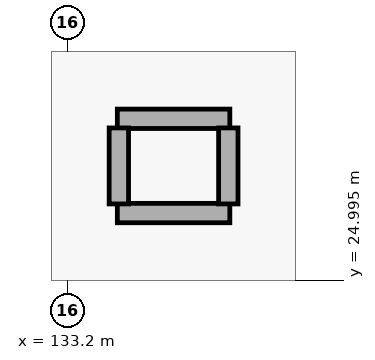
"""IFC4 building model, lengths in metres.
Left out: names, types, materials, properties, quantities, classifications, styles, units other than length and angle.
Written with IfcOpenShell. Run it as: python <this file> out.ifc"""

import sys

from ifc_helpers import new_model, si_unit, direction, frame, frame_2d, origin, place, context, subcontext, project, spatial, rectangle, extrude, element, save


model = new_model("IFC4")
c1 = context("Model", 3, precision=1e-05, world=origin(), true_north=direction((0.0, 1.0)))
c2 = subcontext(c1, "Body", "Model", "MODEL_VIEW")
j1 = project(units=[si_unit("LENGTHUNIT", "METRE"), si_unit("PLANEANGLEUNIT", "RADIAN")], contexts=[c1])
p1 = place(None, origin())
s1 = spatial("IfcSite", under=j1, at=p1, CompositionType="ELEMENT")
p2 = place(p1, origin())
s2 = spatial("IfcBuilding", under=s1, at=p2, CompositionType="ELEMENT")
p3 = place(p2, frame((0.0, 0.0, 5.4)))
s3 = spatial("IfcBuildingStorey", under=s2, at=p3, CompositionType="ELEMENT", Elevation=5.4)
for number, where, z_axis, x_axis in (
    (1, (133.86, 27.12, 0.0), (0.0, 0.0, 1.0), (1.0, 0.0, 0.0)),
    (2, (133.86, 25.88, 0.0), (0.0, 0.0, 1.0), (1.0, 0.0, 0.0)),
):
    element("IfcWall", number, at=place(p3, frame(where, z_axis=z_axis, x_axis=x_axis)), inside=s3, PredefinedType="PARTITIONING", context=c2, shape_type="SweptSolid", body=[
        extrude(rectangle(XDim=1.48, YDim=0.255, at=frame_2d((0.74, 0.0))), origin(), (0.0, 0.0, 1.0), 4.72),
    ])
for number, where, z_axis, x_axis in (
    (3, (133.88, 26.0, 0.0), (0.0, 0.0, 1.0), (0.0, 1.0, 0.0)),
    (4, (135.32, 26.0, 0.0), (0.0, 0.0, 1.0), (0.0, 1.0, 0.0)),
):
    element("IfcWall", number, at=place(p3, frame(where, z_axis=z_axis, x_axis=x_axis)), inside=s3, PredefinedType="PARTITIONING", context=c2, shape_type="SweptSolid", body=[
        extrude(rectangle(XDim=1.0, YDim=0.255, at=frame_2d((0.5, 0.0))), origin(), (0.0, 0.0, 1.0), 4.72),
    ])
save(model, sys.argv[1])
